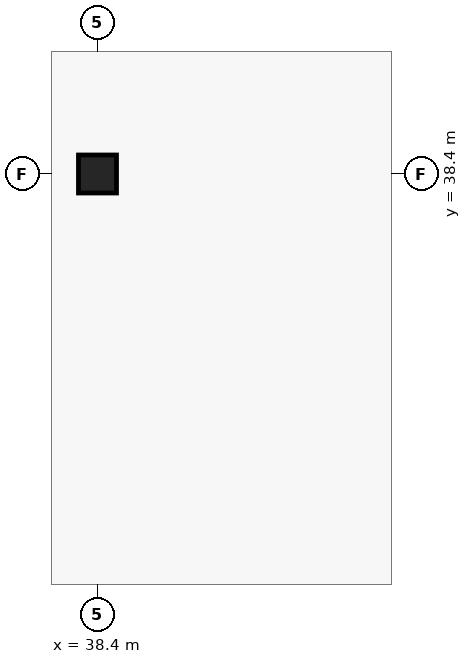
"""IFC4 building model, lengths in metres.
Left out: names, types, materials, properties, quantities, classifications, styles, units other than length and angle.
Written with IfcOpenShell. Run it as: python <this file> out.ifc"""

import sys

from ifc_helpers import new_model, si_unit, direction, frame, origin, origin_2d, place, context, subcontext, project, spatial, rectangle, extrude, element, save


model = new_model("IFC4")
c1 = context("Model", 3, precision=1e-05, world=origin(), true_north=direction((0.0, 1.0)))
c2 = subcontext(c1, "Body", "Model", "MODEL_VIEW")
j1 = project(units=[si_unit("LENGTHUNIT", "METRE"), si_unit("PLANEANGLEUNIT", "RADIAN")], contexts=[c1])
p1 = place(None, origin())
s1 = spatial("IfcSite", under=j1, at=p1, CompositionType="ELEMENT")
p2 = place(p1, origin())
s2 = spatial("IfcBuilding", under=s1, at=p2, CompositionType="ELEMENT")
p3 = place(p2, frame((0.0, 0.0, -4.55)))
s3 = spatial("IfcBuildingStorey", under=s2, at=p3, CompositionType="ELEMENT", Elevation=-4.55)
p4 = place(p3, frame((38.4, 38.4, 0.0), z_axis=(0.0, 0.0, 1.0), x_axis=(1.0, 0.0, 0.0)))
e1 = element("IfcColumn", 1, at=p4, inside=s3, PredefinedType="COLUMN", context=c2, shape_type="SweptSolid", body=[
    extrude(rectangle(XDim=0.5, YDim=0.5, at=origin_2d()), origin(), (0.0, 0.0, 1.0), 4.55),
])
save(model, sys.argv[1])
